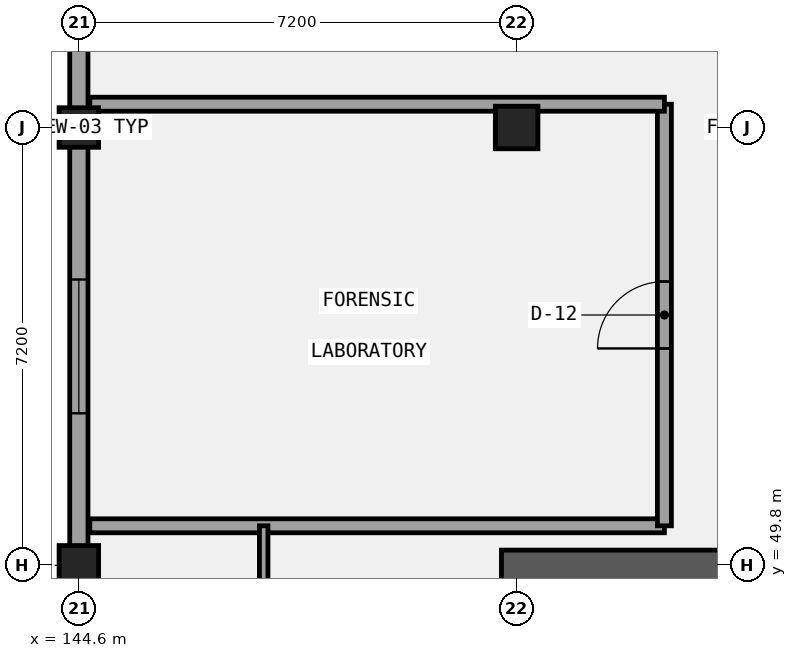
"""IFC4 building model, lengths in metres.
Left out: names, types, materials, properties, quantities, classifications, styles, units other than length and angle.
Written with IfcOpenShell. Run it as: python <this file> out.ifc"""

import sys

from ifc_helpers import new_model, si_unit, direction, frame, frame_2d, origin, origin_2d, place, context, subcontext, project, spatial, rectangle, circle, extrude, element, fill, save


model = new_model("IFC4")
c1 = context("Model", 3, precision=1e-05, world=origin(), true_north=direction((0.0, 1.0)))
c2 = subcontext(c1, "Body", "Model", "MODEL_VIEW")
j1 = project(units=[si_unit("LENGTHUNIT", "METRE"), si_unit("PLANEANGLEUNIT", "RADIAN")], contexts=[c1])
p1 = place(None, origin())
s1 = spatial("IfcSite", under=j1, at=p1, CompositionType="ELEMENT")
p2 = place(p1, origin())
s2 = spatial("IfcBuilding", under=s1, at=p2, CompositionType="ELEMENT")
p3 = place(p2, frame((0.0, 0.0, 5.4)))
s3 = spatial("IfcBuildingStorey", under=s2, at=p3, CompositionType="ELEMENT", Elevation=5.4)
p4 = place(p3, frame((151.55, 49.8, 0.0), z_axis=(0.0, 0.0, 1.0), x_axis=(1.0, 0.0, 0.0)))
e1 = element("IfcWall", 1, at=p4, inside=s3, PredefinedType="SHEAR", context=c2, shape_type="SweptSolid", body=[
    extrude(rectangle(XDim=14.9, YDim=0.5, at=frame_2d((7.45, 0.0))), origin(), (0.0, 0.0, 1.0), 4.2),
])
for number, where, z_axis, x_axis in (
    (2, (144.6, 49.8, 0.0), (0.0, 0.0, 1.0), (1.0, 0.0, 0.0)),
    (3, (144.6, 57.0, 0.0), (0.0, 0.0, 1.0), (1.0, 0.0, 0.0)),
):
    element("IfcColumn", number, at=place(p3, frame(where, z_axis=z_axis, x_axis=x_axis)), inside=s3, PredefinedType="COLUMN", context=c2, shape_type="SweptSolid", body=[
        extrude(circle(Radius=0.325, at=origin_2d()), origin(), (0.0, 0.0, 1.0), 4.2),
    ])
p5 = place(p3, frame((151.8, 57.0, 0.0), z_axis=(0.0, 0.0, 1.0), x_axis=(1.0, 0.0, 0.0)))
e4 = element("IfcColumn", 4, at=p5, inside=s3, PredefinedType="COLUMN", context=c2, shape_type="SweptSolid", body=[
    extrude(rectangle(XDim=0.7, YDim=0.7, at=origin_2d()), origin(), (0.0, 0.0, 1.0), 4.2),
])
p6 = place(p3, frame((144.6, 78.45, 0.0), z_axis=(0.0, 0.0, 1.0), x_axis=(0.0, -1.0, 0.0)))
e5 = element("IfcWall", 5, at=p6, inside=s3, PredefinedType="SOLIDWALL", context=c2, shape_type="SweptSolid", body=[
    extrude(rectangle(XDim=42.9, YDim=0.3, at=frame_2d((21.45, 0.0))), origin(), (0.0, 0.0, 1.0), 2.92),
])
p7 = place(p6, frame((38.275, 0.0, 1.0)))
e6 = element("IfcOpeningElement", 6, at=p7, cuts=e5, PredefinedType="OPENING", context=c2, shape_type="SweptSolid", body=[
    extrude(rectangle(XDim=2.2, YDim=1.4, at=frame_2d((1.1, 0.7))), frame((0.0, 0.16, 0.0), z_axis=(0.0, -1.0, 0.0), x_axis=(1.0, 0.0, 0.0)), (0.0, 0.0, 1.0), 0.32),
])
p8 = place(p6, frame((31.15, 0.0, 1.0)))
e7 = element("IfcOpeningElement", 7, at=p8, cuts=e5, PredefinedType="OPENING", context=c2, shape_type="SweptSolid", body=[
    extrude(rectangle(XDim=2.2, YDim=1.4, at=frame_2d((1.1, 0.7))), frame((0.0, 0.16, 0.0), z_axis=(0.0, -1.0, 0.0), x_axis=(1.0, 0.0, 0.0)), (0.0, 0.0, 1.0), 0.32),
])
p9 = place(p6, frame((23.95, 0.0, 1.0)))
e8 = element("IfcOpeningElement", 8, at=p9, cuts=e5, PredefinedType="OPENING", context=c2, shape_type="SweptSolid", body=[
    extrude(rectangle(XDim=2.2, YDim=1.4, at=frame_2d((1.1, 0.7))), frame((0.0, 0.16, 0.0), z_axis=(0.0, -1.0, 0.0), x_axis=(1.0, 0.0, 0.0)), (0.0, 0.0, 1.0), 0.32),
])
p10 = place(p6, frame((16.75, 0.0, 1.0)))
e9 = element("IfcOpeningElement", 9, at=p10, cuts=e5, PredefinedType="OPENING", context=c2, shape_type="SweptSolid", body=[
    extrude(rectangle(XDim=2.2, YDim=1.4, at=frame_2d((1.1, 0.7))), frame((0.0, 0.16, 0.0), z_axis=(0.0, -1.0, 0.0), x_axis=(1.0, 0.0, 0.0)), (0.0, 0.0, 1.0), 0.32),
])
p11 = place(p6, frame((9.55, 0.0, 1.0)))
e10 = element("IfcOpeningElement", 10, at=p11, cuts=e5, PredefinedType="OPENING", context=c2, shape_type="SweptSolid", body=[
    extrude(rectangle(XDim=2.2, YDim=1.4, at=frame_2d((1.1, 0.7))), frame((0.0, 0.16, 0.0), z_axis=(0.0, -1.0, 0.0), x_axis=(1.0, 0.0, 0.0)), (0.0, 0.0, 1.0), 0.32),
])
p12 = place(p6, frame((2.425, 0.0, 1.0)))
e11 = element("IfcOpeningElement", 11, at=p12, cuts=e5, PredefinedType="OPENING", context=c2, shape_type="SweptSolid", body=[
    extrude(rectangle(XDim=2.2, YDim=1.4, at=frame_2d((1.1, 0.7))), frame((0.0, 0.16, 0.0), z_axis=(0.0, -1.0, 0.0), x_axis=(1.0, 0.0, 0.0)), (0.0, 0.0, 1.0), 0.32),
])
p13 = place(p3, frame((144.78, 50.45, 0.0), z_axis=(0.0, 0.0, 1.0), x_axis=(1.0, 0.0, 0.0)))
e12 = element("IfcWall", 12, at=p13, inside=s3, PredefinedType="PARTITIONING", context=c2, shape_type="SweptSolid", body=[
    extrude(rectangle(XDim=9.45, YDim=0.23, at=frame_2d((4.725, 0.0))), origin(), (0.0, 0.0, 1.0), 3.92),
])
p14 = place(p3, frame((154.23, 50.45, 0.0), z_axis=(0.0, 0.0, 1.0), x_axis=(0.0, 1.0, 0.0)))
e13 = element("IfcWall", 13, at=p14, inside=s3, PredefinedType="PARTITIONING", context=c2, shape_type="SweptSolid", body=[
    extrude(rectangle(XDim=6.933, YDim=0.23, at=frame_2d((3.467, 0.0))), origin(), (0.0, 0.0, 1.0), 3.92),
])
p15 = place(p14, frame((2.917, 0.0, 0.0)))
e14 = element("IfcOpeningElement", 14, at=p15, cuts=e13, PredefinedType="OPENING", context=c2, shape_type="SweptSolid", body=[
    extrude(rectangle(XDim=1.1, YDim=2.35, at=frame_2d((0.55, 1.175))), frame((0.0, 0.125, 0.0), z_axis=(0.0, -1.0, 0.0), x_axis=(1.0, 0.0, 0.0)), (0.0, 0.0, 1.0), 0.25),
])
p16 = place(p3, frame((144.78, 57.383, 0.0), z_axis=(0.0, 0.0, 1.0), x_axis=(1.0, 0.0, 0.0)))
e15 = element("IfcWall", 15, at=p16, inside=s3, PredefinedType="PARTITIONING", context=c2, shape_type="SweptSolid", body=[
    extrude(rectangle(XDim=9.45, YDim=0.23, at=frame_2d((4.725, 0.0))), origin(), (0.0, 0.0, 1.0), 3.12),
])
p17 = place(p3, frame((147.64, 45.025, 0.0), z_axis=(0.0, 0.0, 1.0), x_axis=(0.0, 1.0, 0.0)))
e16 = element("IfcWall", 16, at=p17, inside=s3, PredefinedType="PARTITIONING", context=c2, shape_type="SweptSolid", body=[
    extrude(rectangle(XDim=5.425, YDim=0.14, at=frame_2d((2.712, 0.0))), origin(), (0.0, 0.0, 1.0), 3.92),
])
p18 = place(p17, frame((2.252, 0.0, 0.0)))
e17 = element("IfcOpeningElement", 17, at=p18, cuts=e16, PredefinedType="OPENING", context=c2, shape_type="SweptSolid", body=[
    extrude(rectangle(XDim=0.92, YDim=2.1, at=frame_2d((0.46, 1.05))), frame((0.0, 0.08, 0.0), z_axis=(0.0, -1.0, 0.0), x_axis=(1.0, 0.0, 0.0)), (0.0, 0.0, 1.0), 0.16),
])
p19 = place(p9, origin())
e18 = element("IfcWindow", 18, at=p19, inside=s3, PartitioningType="SINGLE_PANEL", PredefinedType="WINDOW", context=c2, shape_type="SweptSolid", body=[
    extrude(rectangle(XDim=2.2, YDim=1.4, at=frame_2d((1.1, 0.7))), frame((0.0, 0.03, 0.0), z_axis=(0.0, -1.0, 0.0), x_axis=(1.0, 0.0, 0.0)), (0.0, 0.0, 1.0), 0.06),
])
fill(e8, e18)
p20 = place(p15, frame((1.1, 0.0, 0.0), z_axis=(0.0, 0.0, 1.0), x_axis=(-1.0, 0.0, 0.0)))
e19 = element("IfcDoor", 19, at=p20, inside=s3, OperationType="SINGLE_SWING_LEFT", PredefinedType="DOOR", context=c2, shape_type="SweptSolid", body=[
    extrude(rectangle(XDim=1.1, YDim=2.35, at=frame_2d((0.55, 1.175))), frame((0.0, 0.025, 0.0), z_axis=(0.0, -1.0, 0.0), x_axis=(1.0, 0.0, 0.0)), (0.0, 0.0, 1.0), 0.05),
])
fill(e14, e19)
save(model, sys.argv[1])
